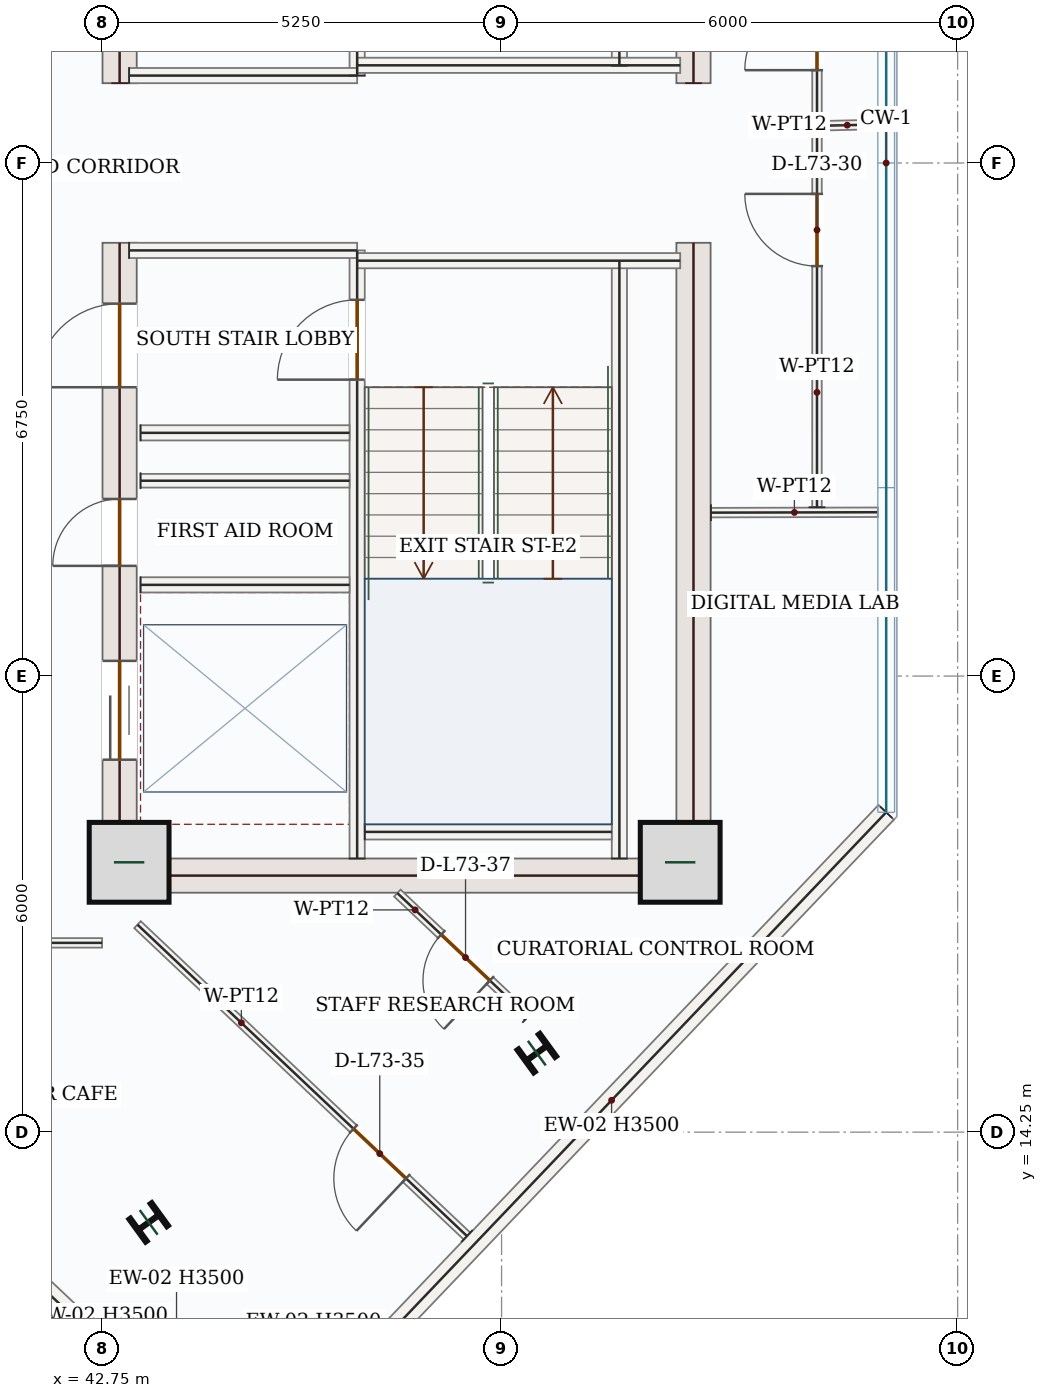
"""IFC4 building model, lengths in metres.
Left out: names, types, materials, properties, quantities, classifications, styles, units other than length and angle.
Written with IfcOpenShell. Run it as: python <this file> out.ifc"""

import sys

from ifc_helpers import new_model, si_unit, direction, frame, frame_2d, origin, origin_2d, place, context, subcontext, project, spatial, rectangle, i_section, extrude, source, transform, mapped, element, fill, save


model = new_model("IFC4")
c1 = context("Model", 3, precision=1e-05, world=origin(), true_north=direction((0.0, 1.0)))
c2 = subcontext(c1, "Body", "Model", "MODEL_VIEW")
j1 = project(units=[si_unit("LENGTHUNIT", "METRE"), si_unit("PLANEANGLEUNIT", "RADIAN")], contexts=[c1])
p1 = place(None, origin())
s1 = spatial("IfcSite", under=j1, at=p1, CompositionType="ELEMENT")
p2 = place(p1, origin())
s2 = spatial("IfcBuilding", under=s1, at=p2, CompositionType="ELEMENT")
p3 = place(p2, frame((0.0, 0.0, 302.85)))
s3 = spatial("IfcBuildingStorey", under=s2, at=p3, CompositionType="ELEMENT", Elevation=302.85)
p4 = place(p3, frame((42.975, 17.4, 0.0), z_axis=(0.0, 0.0, 1.0), x_axis=(0.0, 1.0, 0.0)))
e1 = element("IfcWall", 1, at=p4, inside=s3, PredefinedType="SHEAR", context=c2, shape_type="SweptSolid", body=[
    extrude(rectangle(XDim=8.55, YDim=0.45, at=frame_2d((4.275, 0.0))), origin(), (0.0, 0.0, 1.0), 3.5),
])
p5 = place(p4, frame((6.65, 0.0, 0.0)))
e2 = element("IfcOpeningElement", 2, at=p5, cuts=e1, PredefinedType="OPENING", context=c2, shape_type="SweptSolid", body=[
    extrude(rectangle(XDim=1.1, YDim=2.2, at=frame_2d((0.55, 1.1))), frame((0.0, 0.235, 0.0), z_axis=(0.0, -1.0, 0.0), x_axis=(1.0, 0.0, 0.0)), (0.0, 0.0, 1.0), 0.47),
])
p6 = place(p4, frame((1.75, 0.0, 0.0)))
e3 = element("IfcOpeningElement", 3, at=p6, cuts=e1, PredefinedType="OPENING", context=c2, shape_type="SweptSolid", body=[
    extrude(rectangle(XDim=1.3, YDim=2.2, at=frame_2d((0.65, 1.1))), frame((0.0, 0.235, 0.0), z_axis=(0.0, -1.0, 0.0), x_axis=(1.0, 0.0, 0.0)), (0.0, 0.0, 1.0), 0.47),
])
p7 = place(p4, frame((4.3, 0.0, 0.0)))
e4 = element("IfcOpeningElement", 4, at=p7, cuts=e1, PredefinedType="OPENING", context=c2, shape_type="SweptSolid", body=[
    extrude(rectangle(XDim=0.88, YDim=2.1, at=frame_2d((0.44, 1.05))), frame((0.0, 0.235, 0.0), z_axis=(0.0, -1.0, 0.0), x_axis=(1.0, 0.0, 0.0)), (0.0, 0.0, 1.0), 0.47),
])
p8 = place(p3, frame((42.975, 28.05, 0.0), z_axis=(0.0, 0.0, 1.0), x_axis=(0.0, 1.0, 0.0)))
e5 = element("IfcWall", 5, at=p8, inside=s3, PredefinedType="SHEAR", context=c2, shape_type="SweptSolid", body=[
    extrude(rectangle(XDim=8.55, YDim=0.45, at=frame_2d((4.275, 0.0))), origin(), (0.0, 0.0, 1.0), 3.5),
])
p9 = place(p8, frame((1.5, 0.0, 0.0)))
e6 = element("IfcOpeningElement", 6, at=p9, cuts=e5, PredefinedType="OPENING", context=c2, shape_type="SweptSolid", body=[
    extrude(rectangle(XDim=1.1, YDim=2.2, at=frame_2d((0.55, 1.1))), frame((0.0, 0.235, 0.0), z_axis=(0.0, -1.0, 0.0), x_axis=(1.0, 0.0, 0.0)), (0.0, 0.0, 1.0), 0.47),
])
m1 = source(origin(), c2, "Body", "SweptSolid", [
    extrude(rectangle(XDim=8.55, YDim=0.45, at=frame_2d((4.275, 0.0))), origin(), (0.0, 0.0, 1.0), 3.5),
])
for number, where, z_axis, x_axis in (
    (7, (50.525, 17.4, 0.0), (0.0, 0.0, 1.0), (0.0, 1.0, 0.0)),
    (8, (50.525, 28.05, 0.0), (0.0, 0.0, 1.0), (0.0, 1.0, 0.0)),
):
    element("IfcWall", number, at=place(p3, frame(where, z_axis=z_axis, x_axis=x_axis)), inside=s3, PredefinedType="SHEAR", context=c2, shape_type="MappedRepresentation", body=[
        mapped(m1, transform((0.0, 0.0, 0.0), x_axis=(1.0, 0.0, 0.0), y_axis=(0.0, 1.0, 0.0), z_axis=(0.0, 0.0, 1.0), scale=1.0)),
    ])
m2 = source(origin(), c2, "Body", "SweptSolid", [
    extrude(rectangle(XDim=7.1, YDim=0.45, at=frame_2d((3.55, 0.0))), origin(), (0.0, 0.0, 1.0), 3.5),
])
p10 = place(p3, frame((43.2, 17.625, 0.0), z_axis=(0.0, 0.0, 1.0), x_axis=(1.0, 0.0, 0.0)))
e9 = element("IfcWall", 9, at=p10, inside=s3, PredefinedType="SHEAR", context=c2, shape_type="MappedRepresentation", body=[
    mapped(m2, transform((0.0, 0.0, 0.0), x_axis=(1.0, 0.0, 0.0), y_axis=(0.0, 1.0, 0.0), z_axis=(0.0, 0.0, 1.0), scale=1.0)),
])
m3 = source(origin(), c2, "Body", "SweptSolid", [
    extrude(rectangle(XDim=1.05, YDim=1.05, at=origin_2d()), origin(), (0.0, 0.0, 1.0), 3.75),
])
for number, where, z_axis, x_axis in (
    (10, (43.1, 17.8, 0.0), (0.0, 0.0, 1.0), (1.0, 0.0, 0.0)),
    (11, (50.35, 17.8, 0.0), (0.0, 0.0, 1.0), (1.0, 0.0, 0.0)),
):
    element("IfcColumn", number, at=place(p3, frame(where, z_axis=z_axis, x_axis=x_axis)), inside=s3, PredefinedType="COLUMN", context=c2, shape_type="MappedRepresentation", body=[
        mapped(m3, transform((0.0, 0.0, 0.0), x_axis=(1.0, 0.0, 0.0), y_axis=(0.0, 1.0, 0.0), z_axis=(0.0, 0.0, 1.0), scale=1.0)),
    ])
m4 = source(origin(), c2, "Body", "SweptSolid", [
    extrude(i_section(OverallWidth=0.374, OverallDepth=0.372, WebThickness=0.016, FlangeThickness=0.026, FilletRadius=0.018, at=origin_2d()), origin(), (0.0, 0.0, 1.0), 3.75),
])
for number, where, z_axis, x_axis in (
    (12, (43.357, 13.063, 0.0), (0.0, 0.0, 1.0), (-0.588, 0.809, 0.0)),
    (13, (48.464, 15.289, 0.0), (0.0, 0.0, 1.0), (-0.588, 0.809, 0.0)),
):
    element("IfcColumn", number, at=place(p3, frame(where, z_axis=z_axis, x_axis=x_axis)), inside=s3, PredefinedType="COLUMN", context=c2, shape_type="MappedRepresentation", body=[
        mapped(m4, transform((0.0, 0.0, 0.0), x_axis=(1.0, 0.0, 0.0), y_axis=(0.0, 1.0, 0.0), z_axis=(0.0, 0.0, 1.0), scale=1.0)),
    ])
m5 = source(origin(), c2, "Body", "SweptSolid", [
    extrude(rectangle(XDim=10.47, YDim=0.28, at=frame_2d((5.235, 0.0))), origin(), (0.0, 0.0, 1.0), 3.5),
])
p11 = place(p3, frame((53.06, 18.458, 0.0), z_axis=(0.0, 0.0, 1.0), x_axis=(-0.690070788875, -0.723741878256, 0.0)))
e14 = element("IfcWall", 14, at=p11, inside=s3, PredefinedType="SOLIDWALL", context=c2, shape_type="MappedRepresentation", body=[
    mapped(m5, transform((0.0, 0.0, 0.0), x_axis=(1.0, 0.0, 0.0), y_axis=(0.0, 1.0, 0.0), z_axis=(0.0, 0.0, 1.0), scale=1.0)),
])
p12 = place(p3, frame((43.432, 10.812, 0.0), z_axis=(0.0, 0.0, 1.0), x_axis=(-0.726765623086, 0.686885528382, 0.0)))
e15 = element("IfcWall", 15, at=p12, inside=s3, PredefinedType="SOLIDWALL", context=c2, shape_type="SweptSolid", body=[
    extrude(rectangle(XDim=5.718, YDim=0.28, at=frame_2d((2.859, 0.0))), origin(), (0.0, 0.0, 1.0), 3.5),
])
p13 = place(p12, frame((2.109, 0.0, 0.85)))
e16 = element("IfcOpeningElement", 16, at=p13, cuts=e15, PredefinedType="OPENING", context=c2, shape_type="SweptSolid", body=[
    extrude(rectangle(XDim=1.5, YDim=1.5, at=frame_2d((0.75, 0.75))), frame((0.0, 0.15, 0.0), z_axis=(0.0, -1.0, 0.0), x_axis=(1.0, 0.0, 0.0)), (0.0, 0.0, 1.0), 0.3),
])
m6 = source(origin(), c2, "Body", "SweptSolid", [
    extrude(rectangle(XDim=7.87, YDim=0.2, at=frame_2d((3.935, 0.0))), origin(), (0.0, 0.0, 1.0), 3.5),
])
for number, where, z_axis, x_axis in (
    (17, (49.55, 17.85, 0.0), (0.0, 0.0, 1.0), (0.0, 1.0, 0.0)),
    (18, (49.55, 28.28, 0.0), (0.0, 0.0, 1.0), (0.0, 1.0, 0.0)),
):
    element("IfcWall", number, at=place(p3, frame(where, z_axis=z_axis, x_axis=x_axis)), inside=s3, PredefinedType="SOLIDWALL", context=c2, shape_type="MappedRepresentation", body=[
        mapped(m6, transform((0.0, 0.0, 0.0), x_axis=(1.0, 0.0, 0.0), y_axis=(0.0, 1.0, 0.0), z_axis=(0.0, 0.0, 1.0), scale=1.0)),
    ])
p14 = place(p3, frame((46.1, 17.85, 0.0), z_axis=(0.0, 0.0, 1.0), x_axis=(0.0, 1.0, 0.0)))
e19 = element("IfcWall", 19, at=p14, inside=s3, PredefinedType="SOLIDWALL", context=c2, shape_type="SweptSolid", body=[
    extrude(rectangle(XDim=8.0, YDim=0.2, at=frame_2d((4.0, 0.0))), origin(), (0.0, 0.0, 1.0), 3.5),
])
p15 = place(p14, frame((6.3, 0.0, 0.0)))
e20 = element("IfcOpeningElement", 20, at=p15, cuts=e19, PredefinedType="OPENING", context=c2, shape_type="SweptSolid", body=[
    extrude(rectangle(XDim=1.05, YDim=2.15, at=frame_2d((0.525, 1.075))), frame((0.0, 0.11, 0.0), z_axis=(0.0, -1.0, 0.0), x_axis=(1.0, 0.0, 0.0)), (0.0, 0.0, 1.0), 0.22),
])
p16 = place(p3, frame((46.1, 28.15, 0.0), z_axis=(0.0, 0.0, 1.0), x_axis=(0.0, 1.0, 0.0)))
e21 = element("IfcWall", 21, at=p16, inside=s3, PredefinedType="SOLIDWALL", context=c2, shape_type="SweptSolid", body=[
    extrude(rectangle(XDim=8.0, YDim=0.2, at=frame_2d((4.0, 0.0))), origin(), (0.0, 0.0, 1.0), 3.5),
])
p17 = place(p16, frame((0.4, 0.0, 0.0)))
e22 = element("IfcOpeningElement", 22, at=p17, cuts=e21, PredefinedType="OPENING", context=c2, shape_type="SweptSolid", body=[
    extrude(rectangle(XDim=1.05, YDim=2.15, at=frame_2d((0.525, 1.075))), frame((0.0, 0.11, 0.0), z_axis=(0.0, -1.0, 0.0), x_axis=(1.0, 0.0, 0.0)), (0.0, 0.0, 1.0), 0.22),
])
m7 = source(origin(), c2, "Body", "SweptSolid", [
    extrude(rectangle(XDim=3.0, YDim=0.2, at=frame_2d((1.5, 0.0))), origin(), (0.0, 0.0, 1.0), 3.5),
])
p18 = place(p3, frame((43.1, 25.85, 0.0), z_axis=(0.0, 0.0, 1.0), x_axis=(1.0, 0.0, 0.0)))
e23 = element("IfcWall", 23, at=p18, inside=s3, PredefinedType="SOLIDWALL", context=c2, shape_type="MappedRepresentation", body=[
    mapped(m7, transform((0.0, 0.0, 0.0), x_axis=(1.0, 0.0, 0.0), y_axis=(0.0, 1.0, 0.0), z_axis=(0.0, 0.0, 1.0), scale=1.0)),
])
m8 = source(origin(), c2, "Body", "SweptSolid", [
    extrude(rectangle(XDim=4.25, YDim=0.2, at=frame_2d((2.125, 0.0))), origin(), (0.0, 0.0, 1.0), 3.5),
])
p19 = place(p3, frame((46.1, 25.715, 0.0), z_axis=(0.0, 0.0, 1.0), x_axis=(1.0, 0.0, 0.0)))
e24 = element("IfcWall", 24, at=p19, inside=s3, PredefinedType="SOLIDWALL", context=c2, shape_type="MappedRepresentation", body=[
    mapped(m8, transform((0.0, 0.0, 0.0), x_axis=(1.0, 0.0, 0.0), y_axis=(0.0, 1.0, 0.0), z_axis=(0.0, 0.0, 1.0), scale=1.0)),
])
p20 = place(p3, frame((43.1, 28.15, 0.0), z_axis=(0.0, 0.0, 1.0), x_axis=(1.0, 0.0, 0.0)))
e25 = element("IfcWall", 25, at=p20, inside=s3, PredefinedType="SOLIDWALL", context=c2, shape_type="MappedRepresentation", body=[
    mapped(m7, transform((0.0, 0.0, 0.0), x_axis=(1.0, 0.0, 0.0), y_axis=(0.0, 1.0, 0.0), z_axis=(0.0, 0.0, 1.0), scale=1.0)),
])
p21 = place(p3, frame((46.1, 28.285, 0.0), z_axis=(0.0, 0.0, 1.0), x_axis=(1.0, 0.0, 0.0)))
e26 = element("IfcWall", 26, at=p21, inside=s3, PredefinedType="SOLIDWALL", context=c2, shape_type="MappedRepresentation", body=[
    mapped(m8, transform((0.0, 0.0, 0.0), x_axis=(1.0, 0.0, 0.0), y_axis=(0.0, 1.0, 0.0), z_axis=(0.0, 0.0, 1.0), scale=1.0)),
])
m9 = source(origin(), c2, "Body", "SweptSolid", [
    extrude(rectangle(XDim=3.25, YDim=0.2, at=frame_2d((1.625, 0.0))), origin(), (0.0, 0.0, 1.0), 3.5),
])
p22 = place(p3, frame((46.2, 18.2, 0.0), z_axis=(0.0, 0.0, 1.0), x_axis=(1.0, 0.0, 0.0)))
e27 = element("IfcWall", 27, at=p22, inside=s3, PredefinedType="SOLIDWALL", context=c2, shape_type="MappedRepresentation", body=[
    mapped(m9, transform((0.0, 0.0, 0.0), x_axis=(1.0, 0.0, 0.0), y_axis=(0.0, 1.0, 0.0), z_axis=(0.0, 0.0, 1.0), scale=1.0)),
])
m10 = source(origin(), c2, "Body", "SweptSolid", [
    extrude(rectangle(XDim=2.75, YDim=0.2, at=frame_2d((1.375, 0.0))), origin(), (0.0, 0.0, 1.0), 3.5),
])
for number, where, z_axis, x_axis in (
    (28, (43.25, 23.45, 0.0), (0.0, 0.0, 1.0), (1.0, 0.0, 0.0)),
    (29, (43.25, 21.45, 0.0), (0.0, 0.0, 1.0), (1.0, 0.0, 0.0)),
):
    element("IfcWall", number, at=place(p3, frame(where, z_axis=z_axis, x_axis=x_axis)), inside=s3, PredefinedType="SOLIDWALL", context=c2, shape_type="MappedRepresentation", body=[
        mapped(m10, transform((0.0, 0.0, 0.0), x_axis=(1.0, 0.0, 0.0), y_axis=(0.0, 1.0, 0.0), z_axis=(0.0, 0.0, 1.0), scale=1.0)),
    ])
m11 = source(origin(), c2, "Body", "SweptSolid", [
    extrude(rectangle(XDim=2.75, YDim=0.18, at=frame_2d((1.375, 0.0))), origin(), (0.0, 0.0, 1.0), 3.5),
])
p23 = place(p3, frame((43.25, 22.82, 0.0), z_axis=(0.0, 0.0, 1.0), x_axis=(1.0, 0.0, 0.0)))
e30 = element("IfcWall", 30, at=p23, inside=s3, PredefinedType="PARTITIONING", context=c2, shape_type="MappedRepresentation", body=[
    mapped(m11, transform((0.0, 0.0, 0.0), x_axis=(1.0, 0.0, 0.0), y_axis=(0.0, 1.0, 0.0), z_axis=(0.0, 0.0, 1.0), scale=1.0)),
])
p24 = place(p3, frame((48.349, 15.769, 0.0), z_axis=(0.0, 0.0, 1.0), x_axis=(-0.726735597886, 0.686917295433, 0.0)))
e31 = element("IfcWall", 31, at=p24, inside=s3, PredefinedType="PARTITIONING", context=c2, shape_type="SweptSolid", body=[
    extrude(rectangle(XDim=2.367, YDim=0.125, at=frame_2d((1.183, 0.0))), origin(), (0.0, 0.0, 1.0), 3.5),
])
p25 = place(p24, frame((0.692, 0.0, 0.0)))
e32 = element("IfcOpeningElement", 32, at=p25, cuts=e31, PredefinedType="OPENING", context=c2, shape_type="SweptSolid", body=[
    extrude(rectangle(XDim=0.88, YDim=2.1, at=frame_2d((0.44, 1.05))), frame((0.0, 0.073, 0.0), z_axis=(0.0, -1.0, 0.0), x_axis=(1.0, 0.0, 0.0)), (0.0, 0.0, 1.0), 0.145),
])
p26 = place(p3, frame((47.544, 12.883, 0.0), z_axis=(0.0, 0.0, 1.0), x_axis=(-0.726761082497, 0.686890332562, 0.0)))
e33 = element("IfcWall", 33, at=p26, inside=s3, PredefinedType="PARTITIONING", context=c2, shape_type="SweptSolid", body=[
    extrude(rectangle(XDim=5.964, YDim=0.125, at=frame_2d((2.982, 0.0))), origin(), (0.0, 0.0, 1.0), 3.5),
])
p27 = place(p26, frame((1.103, 0.0, 0.0)))
e34 = element("IfcOpeningElement", 34, at=p27, cuts=e33, PredefinedType="OPENING", context=c2, shape_type="SweptSolid", body=[
    extrude(rectangle(XDim=0.95, YDim=2.15, at=frame_2d((0.475, 1.075))), frame((0.0, 0.073, 0.0), z_axis=(0.0, -1.0, 0.0), x_axis=(1.0, 0.0, 0.0)), (0.0, 0.0, 1.0), 0.145),
])
m12 = source(origin(), c2, "Body", "SweptSolid", [
    extrude(rectangle(XDim=2.195, YDim=0.125, at=frame_2d((1.098, 0.0))), origin(), (0.0, 0.0, 1.0), 3.5),
])
p28 = place(p3, frame((50.755, 22.4, 0.0), z_axis=(0.0, 0.0, 1.0), x_axis=(0.999997006375, 0.002446884011, 0.0)))
e35 = element("IfcWall", 35, at=p28, inside=s3, PredefinedType="PARTITIONING", context=c2, shape_type="MappedRepresentation", body=[
    mapped(m12, transform((0.0, 0.0, 0.0), x_axis=(1.0, 0.0, 0.0), y_axis=(0.0, 1.0, 0.0), z_axis=(0.0, 0.0, 1.0), scale=1.0)),
])
p29 = place(p3, frame((52.149, 22.471, 0.0), z_axis=(0.0, 0.0, 1.0), x_axis=(9.7318865e-05, 0.999999995265, 0.0)))
e36 = element("IfcWall", 36, at=p29, inside=s3, PredefinedType="PARTITIONING", context=c2, shape_type="SweptSolid", body=[
    extrude(rectangle(XDim=5.017, YDim=0.125, at=frame_2d((2.509, 0.0))), origin(), (0.0, 0.0, 1.0), 3.5),
])
p30 = place(p29, frame((3.173, 0.0, 0.0)))
e37 = element("IfcOpeningElement", 37, at=p30, cuts=e36, PredefinedType="OPENING", context=c2, shape_type="SweptSolid", body=[
    extrude(rectangle(XDim=0.95, YDim=2.15, at=frame_2d((0.475, 1.075))), frame((0.0, 0.073, 0.0), z_axis=(0.0, -1.0, 0.0), x_axis=(1.0, 0.0, 0.0)), (0.0, 0.0, 1.0), 0.145),
])
m13 = source(origin(), c2, "Body", "SweptSolid", [
    extrude(rectangle(XDim=0.795, YDim=0.125, at=frame_2d((0.398, 0.0))), origin(), (0.0, 0.0, 1.0), 3.5),
])
p31 = place(p3, frame((52.15, 27.488, 0.0), z_axis=(0.0, 0.0, 1.0), x_axis=(0.999727865024, 0.023328006675, 0.0)))
e38 = element("IfcWall", 38, at=p31, inside=s3, PredefinedType="PARTITIONING", context=c2, shape_type="MappedRepresentation", body=[
    mapped(m13, transform((0.0, 0.0, 0.0), x_axis=(1.0, 0.0, 0.0), y_axis=(0.0, 1.0, 0.0), z_axis=(0.0, 0.0, 1.0), scale=1.0)),
])
p32 = place(p3, frame((52.15, 27.556, 0.0), z_axis=(0.0, 0.0, 1.0), x_axis=(-0.000245639885, 0.999999969831, 0.0)))
e39 = element("IfcWall", 39, at=p32, inside=s3, PredefinedType="PARTITIONING", context=c2, shape_type="SweptSolid", body=[
    extrude(rectangle(XDim=3.976, YDim=0.125, at=frame_2d((1.988, 0.0))), origin(), (0.0, 0.0, 1.0), 3.5),
])
p33 = place(p32, frame((0.666, 0.0, 0.0)))
e40 = element("IfcOpeningElement", 40, at=p33, cuts=e39, PredefinedType="OPENING", context=c2, shape_type="SweptSolid", body=[
    extrude(rectangle(XDim=0.95, YDim=2.15, at=frame_2d((0.475, 1.075))), frame((0.0, 0.073, 0.0), z_axis=(0.0, -1.0, 0.0), x_axis=(1.0, 0.0, 0.0)), (0.0, 0.0, 1.0), 0.145),
])
p34 = place(p3, frame((36.28, 16.74, 0.0), z_axis=(0.0, 0.0, 1.0), x_axis=(1.0, 0.0, 0.0)))
e41 = element("IfcWall", 41, at=p34, inside=s3, PredefinedType="PARTITIONING", context=c2, shape_type="SweptSolid", body=[
    extrude(rectangle(XDim=6.464, YDim=0.125, at=frame_2d((3.232, 0.0))), origin(), (0.0, 0.0, 1.0), 3.5),
])
p35 = place(p34, frame((1.213, 0.0, 0.0)))
e42 = element("IfcOpeningElement", 42, at=p35, cuts=e41, PredefinedType="OPENING", context=c2, shape_type="SweptSolid", body=[
    extrude(rectangle(XDim=0.95, YDim=2.15, at=frame_2d((0.475, 1.075))), frame((0.0, 0.073, 0.0), z_axis=(0.0, -1.0, 0.0), x_axis=(1.0, 0.0, 0.0)), (0.0, 0.0, 1.0), 0.145),
])
m14 = source(origin(), c2, "Body", "SweptSolid", [
    extrude(rectangle(XDim=1.05, YDim=2.15, at=frame_2d((0.525, 1.075))), frame((0.0, 0.025, 0.0), z_axis=(0.0, -1.0, 0.0), x_axis=(1.0, 0.0, 0.0)), (0.0, 0.0, 1.0), 0.05),
])
p36 = place(p15, origin())
e43 = element("IfcDoor", 43, at=p36, inside=s3, OperationType="SINGLE_SWING_LEFT", PredefinedType="DOOR", context=c2, shape_type="MappedRepresentation", body=[
    mapped(m14, transform((0.0, 0.0, 0.0), x_axis=(1.0, 0.0, 0.0), y_axis=(0.0, 1.0, 0.0), z_axis=(0.0, 0.0, 1.0), scale=1.0)),
])
fill(e20, e43)
m15 = source(origin(), c2, "Body", "SweptSolid", [
    extrude(rectangle(XDim=1.1, YDim=2.2, at=frame_2d((0.55, 1.1))), frame((0.0, 0.025, 0.0), z_axis=(0.0, -1.0, 0.0), x_axis=(1.0, 0.0, 0.0)), (0.0, 0.0, 1.0), 0.05),
])
p37 = place(p5, origin())
e44 = element("IfcDoor", 44, at=p37, inside=s3, OperationType="SINGLE_SWING_LEFT", PredefinedType="DOOR", context=c2, shape_type="MappedRepresentation", body=[
    mapped(m15, transform((0.0, 0.0, 0.0), x_axis=(1.0, 0.0, 0.0), y_axis=(0.0, 1.0, 0.0), z_axis=(0.0, 0.0, 1.0), scale=1.0)),
])
fill(e2, e44)
m16 = source(origin(), c2, "Body", "SweptSolid", [
    extrude(rectangle(XDim=1.3, YDim=2.2, at=frame_2d((0.65, 1.1))), frame((0.0, 0.025, 0.0), z_axis=(0.0, -1.0, 0.0), x_axis=(1.0, 0.0, 0.0)), (0.0, 0.0, 1.0), 0.05),
])
p38 = place(p6, origin())
e45 = element("IfcDoor", 45, at=p38, inside=s3, OperationType="DOUBLE_DOOR_SLIDING", PredefinedType="DOOR", context=c2, shape_type="MappedRepresentation", body=[
    mapped(m16, transform((0.0, 0.0, 0.0), x_axis=(1.0, 0.0, 0.0), y_axis=(0.0, 1.0, 0.0), z_axis=(0.0, 0.0, 1.0), scale=1.0)),
])
fill(e3, e45)
m17 = source(origin(), c2, "Body", "SweptSolid", [
    extrude(rectangle(XDim=0.88, YDim=2.1, at=frame_2d((0.44, 1.05))), frame((0.0, 0.025, 0.0), z_axis=(0.0, -1.0, 0.0), x_axis=(1.0, 0.0, 0.0)), (0.0, 0.0, 1.0), 0.05),
])
p39 = place(p7, origin())
e46 = element("IfcDoor", 46, at=p39, inside=s3, OperationType="SINGLE_SWING_LEFT", PredefinedType="DOOR", context=c2, shape_type="MappedRepresentation", body=[
    mapped(m17, transform((0.0, 0.0, 0.0), x_axis=(1.0, 0.0, 0.0), y_axis=(0.0, 1.0, 0.0), z_axis=(0.0, 0.0, 1.0), scale=1.0)),
])
fill(e4, e46)
m18 = source(origin(), c2, "Body", "SweptSolid", [
    extrude(rectangle(XDim=0.95, YDim=2.15, at=frame_2d((0.475, 1.075))), frame((0.0, 0.025, 0.0), z_axis=(0.0, -1.0, 0.0), x_axis=(1.0, 0.0, 0.0)), (0.0, 0.0, 1.0), 0.05),
])
p40 = place(p33, origin())
e47 = element("IfcDoor", 47, at=p40, inside=s3, OperationType="SINGLE_SWING_LEFT", PredefinedType="DOOR", context=c2, shape_type="MappedRepresentation", body=[
    mapped(m18, transform((0.0, 0.0, 0.0), x_axis=(1.0, 0.0, 0.0), y_axis=(0.0, 1.0, 0.0), z_axis=(0.0, 0.0, 1.0), scale=1.0)),
])
fill(e40, e47)
p41 = place(p30, origin())
e48 = element("IfcDoor", 48, at=p41, inside=s3, OperationType="SINGLE_SWING_RIGHT", PredefinedType="DOOR", context=c2, shape_type="MappedRepresentation", body=[
    mapped(m18, transform((0.0, 0.0, 0.0), x_axis=(1.0, 0.0, 0.0), y_axis=(0.0, 1.0, 0.0), z_axis=(0.0, 0.0, 1.0), scale=1.0)),
])
fill(e37, e48)
p42 = place(p27, origin())
e49 = element("IfcDoor", 49, at=p42, inside=s3, OperationType="SINGLE_SWING_LEFT", PredefinedType="DOOR", context=c2, shape_type="MappedRepresentation", body=[
    mapped(m18, transform((0.0, 0.0, 0.0), x_axis=(1.0, 0.0, 0.0), y_axis=(0.0, 1.0, 0.0), z_axis=(0.0, 0.0, 1.0), scale=1.0)),
])
fill(e34, e49)
p43 = place(p25, origin())
e50 = element("IfcDoor", 50, at=p43, inside=s3, OperationType="SINGLE_SWING_LEFT", PredefinedType="DOOR", context=c2, shape_type="MappedRepresentation", body=[
    mapped(m17, transform((0.0, 0.0, 0.0), x_axis=(1.0, 0.0, 0.0), y_axis=(0.0, 1.0, 0.0), z_axis=(0.0, 0.0, 1.0), scale=1.0)),
])
fill(e32, e50)
save(model, sys.argv[1])
